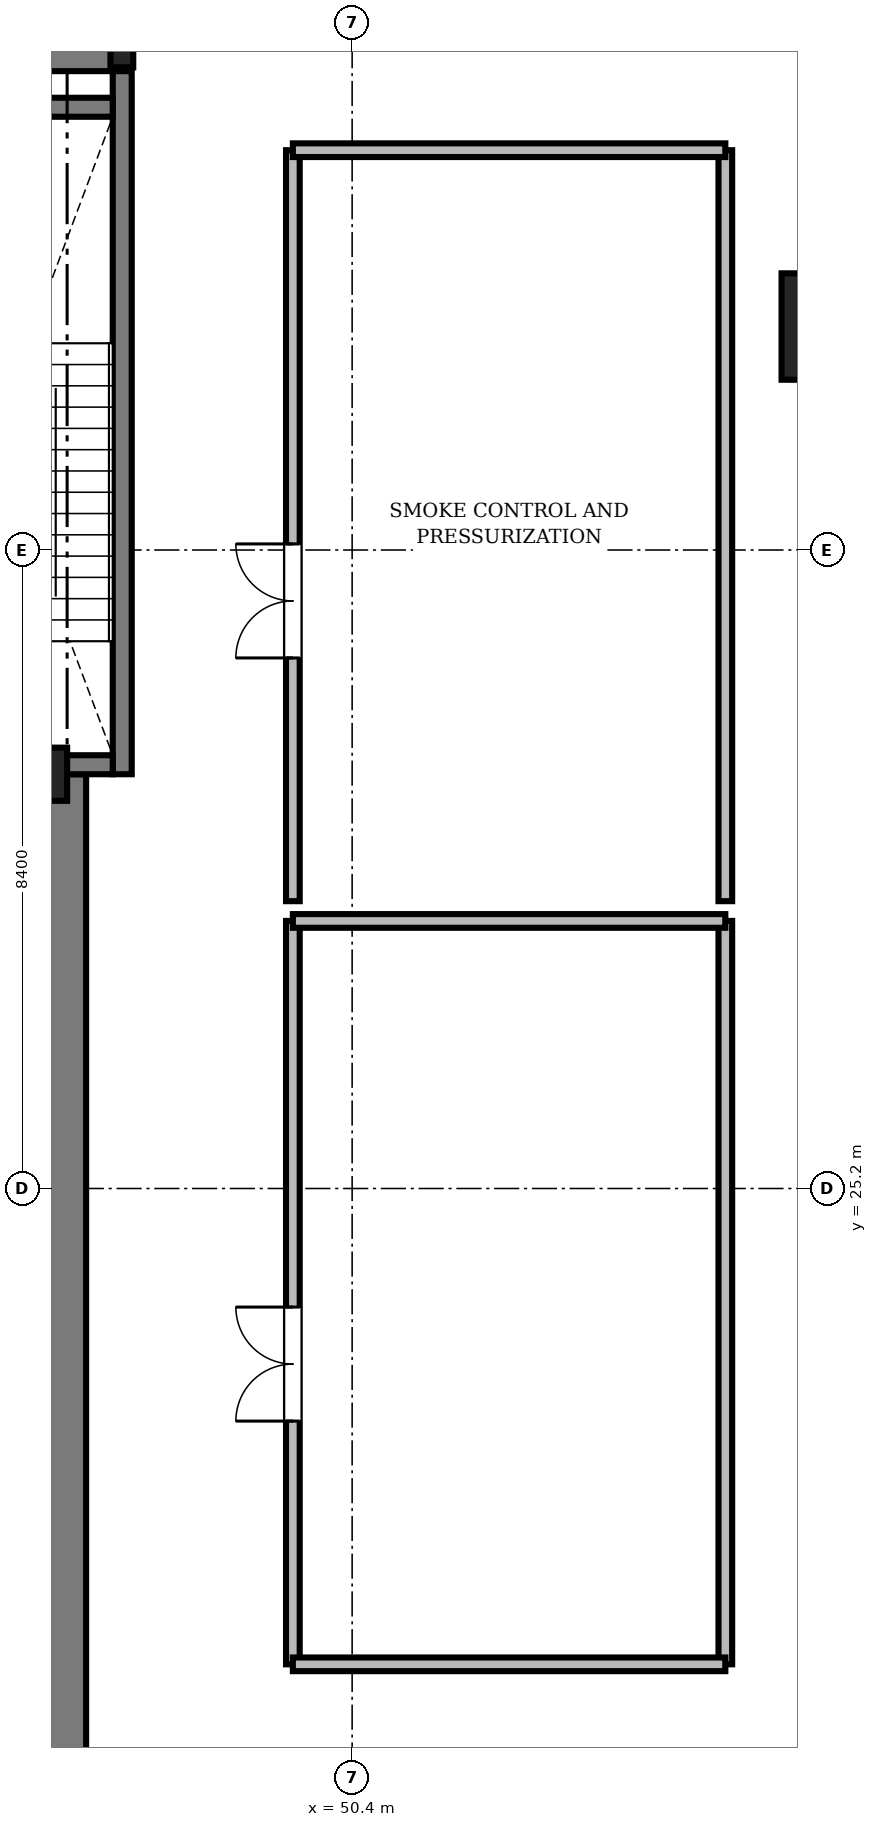
"""IFC4 building model, lengths in metres.
Left out: names, types, materials, properties, quantities, classifications, styles, units other than length and angle.
Written with IfcOpenShell. Run it as: python <this file> out.ifc"""

import sys

from ifc_helpers import new_model, si_unit, direction, frame, frame_2d, origin, origin_2d, place, context, subcontext, project, spatial, rectangle, i_section, extrude, source, transform, mapped, element, fill, save


model = new_model("IFC4")
c1 = context("Model", 3, precision=1e-05, world=origin(), true_north=direction((0.0, 1.0)))
c2 = subcontext(c1, "Body", "Model", "MODEL_VIEW")
j1 = project(units=[si_unit("LENGTHUNIT", "METRE"), si_unit("PLANEANGLEUNIT", "RADIAN")], contexts=[c1])
p1 = place(None, origin())
s1 = spatial("IfcSite", under=j1, at=p1, CompositionType="ELEMENT")
p2 = place(p1, origin())
s2 = spatial("IfcBuilding", under=s1, at=p2, CompositionType="ELEMENT")
p3 = place(p2, frame((0.0, 0.0, 237.3)))
s3 = spatial("IfcBuildingStorey", under=s2, at=p3, CompositionType="ELEMENT", Elevation=237.3)
m1 = source(origin(), c2, "Body", "SweptSolid", [
    extrude(rectangle(XDim=17.52, YDim=0.8, at=frame_2d((8.76, 0.0))), origin(), (0.0, 0.0, 1.0), 4.75),
])
p4 = place(p3, frame((29.85, 40.3, 0.0), z_axis=(0.0, 0.0, 1.0), x_axis=(1.0, 0.0, 0.0)))
e1 = element("IfcWall", 1, at=p4, inside=s3, PredefinedType="SHEAR", context=c2, shape_type="MappedRepresentation", body=[
    mapped(m1, transform((0.0, 0.0, 0.0), scale=1.0)),
])
m2 = source(origin(), c2, "Body", "SweptSolid", [
    extrude(rectangle(XDim=13.15, YDim=0.8, at=frame_2d((6.575, 0.0))), origin(), (0.0, 0.0, 1.0), 4.75),
])
p5 = place(p3, frame((46.5, 17.5, 0.0), z_axis=(0.0, 0.0, 1.0), x_axis=(0.0, 1.0, 0.0)))
e2 = element("IfcWall", 2, at=p5, inside=s3, PredefinedType="SHEAR", context=c2, shape_type="MappedRepresentation", body=[
    mapped(m2, transform((0.0, 0.0, 0.0), scale=1.0)),
])
m3 = source(origin(), c2, "Body", "SweptSolid", [
    extrude(i_section(OverallWidth=0.3, OverallDepth=0.7, WebThickness=0.017, FlangeThickness=0.032, FilletRadius=0.027, at=origin_2d()), origin(), (0.0, 0.0, 1.0), 4.75),
])
for number, where, z_axis, x_axis in (
    (3, (46.5, 30.65, 0.0), (0.0, 0.0, 1.0), (1.0, 0.0, 0.0)),
    (4, (47.37, 40.3, 0.0), (0.0, 0.0, 1.0), (1.0, 0.0, 0.0)),
):
    element("IfcColumn", number, at=place(p3, frame(where, z_axis=z_axis, x_axis=x_axis)), inside=s3, PredefinedType="COLUMN", context=c2, shape_type="MappedRepresentation", body=[
        mapped(m3, transform((0.0, 0.0, 0.0), scale=1.0)),
    ])
m4 = source(origin(), c2, "Body", "SweptSolid", [
    extrude(rectangle(XDim=1.4, YDim=1.4, at=origin_2d()), origin(), (0.0, 0.0, 1.0), 6.543),
])
p6 = place(p3, frame((56.75, 36.54, 0.0), z_axis=(0.687744647911, 0.0, 0.725952683906), x_axis=(0.0, 1.0, 0.0)))
e5 = element("IfcColumn", 5, at=p6, inside=s3, PredefinedType="COLUMN", context=c2, shape_type="MappedRepresentation", body=[
    mapped(m4, transform((0.0, 0.0, 0.0), scale=1.0)),
])
m5 = source(origin(), c2, "Body", "SweptSolid", [
    extrude(rectangle(XDim=9.25, YDim=0.25, at=frame_2d((4.625, 0.0))), origin(), (0.0, 0.0, 1.0), 5.2),
])
p7 = place(p3, frame((47.375, 30.65, 0.0), z_axis=(0.0, 0.0, 1.0), x_axis=(0.0, 1.0, 0.0)))
e6 = element("IfcWall", 6, at=p7, inside=s3, PredefinedType="SOLIDWALL", context=c2, shape_type="MappedRepresentation", body=[
    mapped(m5, transform((0.0, 0.0, 0.0), scale=1.0)),
])
m6 = source(origin(), c2, "Body", "SweptSolid", [
    extrude(rectangle(XDim=3.15, YDim=0.25, at=frame_2d((1.575, 0.0))), origin(), (0.0, 0.0, 1.0), 5.2),
])
p8 = place(p3, frame((44.1, 39.425, 0.0), z_axis=(0.0, 0.0, 1.0), x_axis=(1.0, 0.0, 0.0)))
e7 = element("IfcWall", 7, at=p8, inside=s3, PredefinedType="SOLIDWALL", context=c2, shape_type="MappedRepresentation", body=[
    mapped(m6, transform((0.0, 0.0, 0.0), scale=1.0)),
])
p9 = place(p3, frame((44.1, 30.775, 0.0), z_axis=(0.0, 0.0, 1.0), x_axis=(1.0, 0.0, 0.0)))
e8 = element("IfcWall", 8, at=p9, inside=s3, PredefinedType="SOLIDWALL", context=c2, shape_type="MappedRepresentation", body=[
    mapped(m6, transform((0.0, 0.0, 0.0), scale=1.0)),
])
m7 = source(origin(), c2, "Body", "SweptSolid", [
    extrude(rectangle(XDim=1.1, YDim=2.2, at=frame_2d((0.55, 1.1))), frame((0.0, 0.135, 0.0), z_axis=(0.0, -1.0, 0.0), x_axis=(1.0, 0.0, 0.0)), (0.0, 0.0, 1.0), 0.27),
])
p10 = place(p9, frame((0.35, 0.0, 0.0)))
e9 = element("IfcOpeningElement", 9, at=p10, cuts=e8, PredefinedType="OPENING", context=c2, shape_type="MappedRepresentation", body=[
    mapped(m7, transform((0.0, 0.0, 0.0), scale=1.0)),
])
m8 = source(origin(), c2, "Body", "SweptSolid", [
    extrude(rectangle(XDim=9.88, YDim=0.18, at=frame_2d((4.94, 0.0))), origin(), (0.0, 0.0, 1.0), 4.75),
])
p11 = place(p3, frame((49.62, 28.98, 0.0), z_axis=(0.0, 0.0, 1.0), x_axis=(0.0, 1.0, 0.0)))
e10 = element("IfcWall", 10, at=p11, inside=s3, PredefinedType="PARTITIONING", context=c2, shape_type="MappedRepresentation", body=[
    mapped(m8, transform((0.0, 0.0, 0.0), scale=1.0)),
])
m9 = source(origin(), c2, "Body", "SweptSolid", [
    extrude(rectangle(XDim=1.5, YDim=2.3, at=frame_2d((0.75, 1.15))), frame((0.0, 0.1, 0.0), z_axis=(0.0, -1.0, 0.0), x_axis=(1.0, 0.0, 0.0)), (0.0, 0.0, 1.0), 0.2),
])
p12 = place(p11, frame((3.2, 0.0, 0.0)))
e11 = element("IfcOpeningElement", 11, at=p12, cuts=e10, PredefinedType="OPENING", context=c2, shape_type="MappedRepresentation", body=[
    mapped(m9, transform((0.0, 0.0, 0.0), scale=1.0)),
])
m10 = source(origin(), c2, "Body", "SweptSolid", [
    extrude(rectangle(XDim=9.78, YDim=0.18, at=frame_2d((4.89, 0.0))), origin(), (0.0, 0.0, 1.0), 4.442),
])
p13 = place(p3, frame((49.62, 18.94, 0.0), z_axis=(0.0, 0.0, 1.0), x_axis=(0.0, 1.0, 0.0)))
e12 = element("IfcWall", 12, at=p13, inside=s3, PredefinedType="PARTITIONING", context=c2, shape_type="MappedRepresentation", body=[
    mapped(m10, transform((0.0, 0.0, 0.0), scale=1.0)),
])
p14 = place(p13, frame((3.2, 0.0, 0.0)))
e13 = element("IfcOpeningElement", 13, at=p14, cuts=e12, PredefinedType="OPENING", context=c2, shape_type="MappedRepresentation", body=[
    mapped(m9, transform((0.0, 0.0, 0.0), scale=1.0)),
])
p15 = place(p3, frame((55.31, 28.98, 0.0), z_axis=(0.0, 0.0, 1.0), x_axis=(0.0, 1.0, 0.0)))
e14 = element("IfcWall", 14, at=p15, inside=s3, PredefinedType="PARTITIONING", context=c2, shape_type="MappedRepresentation", body=[
    mapped(m8, transform((0.0, 0.0, 0.0), scale=1.0)),
])
p16 = place(p3, frame((55.31, 18.94, 0.0), z_axis=(0.0, 0.0, 1.0), x_axis=(0.0, 1.0, 0.0)))
e15 = element("IfcWall", 15, at=p16, inside=s3, PredefinedType="PARTITIONING", context=c2, shape_type="MappedRepresentation", body=[
    mapped(m10, transform((0.0, 0.0, 0.0), scale=1.0)),
])
m11 = source(origin(), c2, "Body", "SweptSolid", [
    extrude(rectangle(XDim=5.69, YDim=0.18, at=frame_2d((2.845, 0.0))), origin(), (0.0, 0.0, 1.0), 4.75),
])
for number, where, z_axis, x_axis in (
    (16, (49.62, 18.94, 0.0), (0.0, 0.0, 1.0), (1.0, 0.0, 0.0)),
    (17, (49.62, 28.72, 0.0), (0.0, 0.0, 1.0), (1.0, 0.0, 0.0)),
    (18, (49.62, 38.86, 0.0), (0.0, 0.0, 1.0), (1.0, 0.0, 0.0)),
):
    element("IfcWall", number, at=place(p3, frame(where, z_axis=z_axis, x_axis=x_axis)), inside=s3, PredefinedType="PARTITIONING", context=c2, shape_type="MappedRepresentation", body=[
        mapped(m11, transform((0.0, 0.0, 0.0), scale=1.0)),
    ])
m12 = source(origin(), c2, "Body", "SweptSolid", [
    extrude(rectangle(XDim=1.5, YDim=2.3, at=frame_2d((0.75, 1.15))), frame((0.0, 0.025, 0.0), z_axis=(0.0, -1.0, 0.0), x_axis=(1.0, 0.0, 0.0)), (0.0, 0.0, 1.0), 0.05),
])
p17 = place(p12, origin())
e19 = element("IfcDoor", 19, at=p17, inside=s3, OperationType="DOUBLE_DOOR_SINGLE_SWING", PredefinedType="DOOR", context=c2, shape_type="MappedRepresentation", body=[
    mapped(m12, transform((0.0, 0.0, 0.0), scale=1.0)),
])
fill(e11, e19)
p18 = place(p14, origin())
e20 = element("IfcDoor", 20, at=p18, inside=s3, OperationType="DOUBLE_DOOR_SINGLE_SWING", PredefinedType="DOOR", context=c2, shape_type="MappedRepresentation", body=[
    mapped(m12, transform((0.0, 0.0, 0.0), scale=1.0)),
])
fill(e13, e20)
save(model, sys.argv[1])
